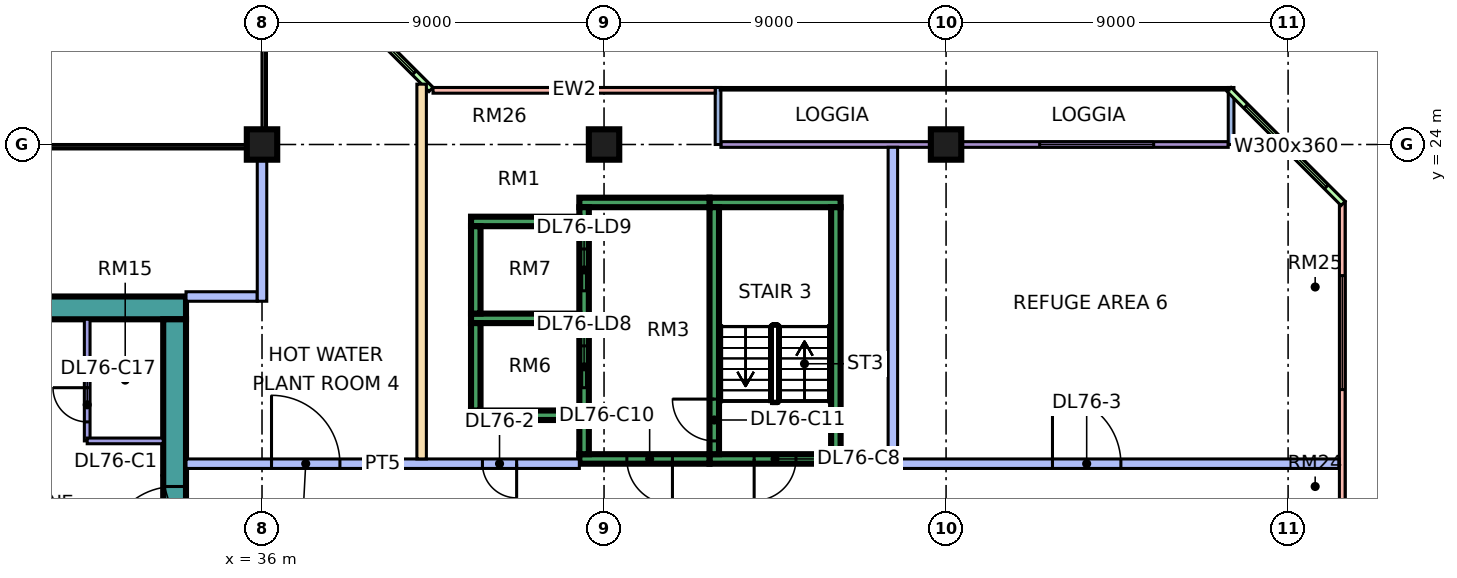
"""IFC4 building model, lengths in metres.
Left out: names, types, materials, properties, quantities, classifications, styles, units other than length and angle.
Written with IfcOpenShell. Run it as: python <this file> out.ifc"""

import sys

from ifc_helpers import new_model, si_unit, direction, frame, frame_2d, origin, origin_2d, place, context, subcontext, project, spatial, rectangle, extrude, element, fill, save


model = new_model("IFC4")
c1 = context("Model", 3, precision=1e-05, world=origin(), true_north=direction((0.0, 1.0)))
c2 = subcontext(c1, "Body", "Model", "MODEL_VIEW")
j1 = project(units=[si_unit("LENGTHUNIT", "METRE"), si_unit("PLANEANGLEUNIT", "RADIAN")], contexts=[c1])
p1 = place(None, origin())
s1 = spatial("IfcSite", under=j1, at=p1, CompositionType="ELEMENT")
p2 = place(p1, origin())
s2 = spatial("IfcBuilding", under=s1, at=p2, CompositionType="ELEMENT")
p3 = place(p2, frame((0.0, 0.0, 322.15)))
s3 = spatial("IfcBuildingStorey", under=s2, at=p3, CompositionType="ELEMENT", Elevation=322.15)
for number, where, z_axis, x_axis in (
    (1, (36.0, 24.0, 0.0), (0.0, 0.0, 1.0), (1.0, 0.0, 0.0)),
    (2, (45.0, 24.0, 0.0), (0.0, 0.0, 1.0), (1.0, 0.0, 0.0)),
    (3, (54.0, 24.0, 0.0), (0.0, 0.0, 1.0), (1.0, 0.0, 0.0)),
):
    element("IfcColumn", number, at=place(p3, frame(where, z_axis=z_axis, x_axis=x_axis)), inside=s3, PredefinedType="COLUMN", context=c2, shape_type="SweptSolid", body=[
        extrude(rectangle(XDim=0.8, YDim=0.8, at=origin_2d()), origin(), (0.0, 0.0, 1.0), 5.5),
    ])
p4 = place(p3, frame((9.0, 19.7, 0.0), z_axis=(0.0, 0.0, 1.0), x_axis=(1.0, 0.0, 0.0)))
e4 = element("IfcWall", 4, at=p4, inside=s3, PredefinedType="SHEAR", context=c2, shape_type="SweptSolid", body=[
    extrude(rectangle(XDim=25.0, YDim=0.6, at=frame_2d((12.5, 0.0))), origin(), (0.0, 0.0, 1.0), 5.5),
])
p5 = place(p4, frame((19.1, 0.0, 0.0)))
e5 = element("IfcOpeningElement", 5, at=p5, cuts=e4, PredefinedType="OPENING", context=c2, shape_type="SweptSolid", body=[
    extrude(rectangle(XDim=1.8, YDim=2.4, at=frame_2d((0.9, 1.2))), frame((0.0, 0.31, 0.0), z_axis=(0.0, -1.0, 0.0), x_axis=(1.0, 0.0, 0.0)), (0.0, 0.0, 1.0), 0.62),
])
p6 = place(p3, frame((33.7, 7.6, 0.0), z_axis=(0.0, 0.0, 1.0), x_axis=(0.0, 1.0, 0.0)))
e6 = element("IfcWall", 6, at=p6, inside=s3, PredefinedType="SHEAR", context=c2, shape_type="SweptSolid", body=[
    extrude(rectangle(XDim=11.8, YDim=0.6, at=frame_2d((5.9, 0.0))), origin(), (0.0, 0.0, 1.0), 5.5),
])
p7 = place(p6, frame((5.6, 0.0, 0.0)))
e7 = element("IfcOpeningElement", 7, at=p7, cuts=e6, PredefinedType="OPENING", context=c2, shape_type="SweptSolid", body=[
    extrude(rectangle(XDim=1.8, YDim=2.4, at=frame_2d((0.9, 1.2))), frame((0.0, 0.31, 0.0), z_axis=(0.0, -1.0, 0.0), x_axis=(1.0, 0.0, 0.0)), (0.0, 0.0, 1.0), 0.62),
])
p8 = place(p3, frame((47.775, 15.725, 0.0), z_axis=(0.0, 0.0, 1.0), x_axis=(1.0, 0.0, 0.0)))
e8 = element("IfcWall", 8, at=p8, inside=s3, PredefinedType="SHEAR", context=c2, shape_type="SweptSolid", body=[
    extrude(rectangle(XDim=3.45, YDim=0.25, at=frame_2d((1.725, 0.0))), origin(), (0.0, 0.0, 1.0), 5.5),
])
p9 = place(p8, frame((1.175, 0.0, 0.0)))
e9 = element("IfcOpeningElement", 9, at=p9, cuts=e8, PredefinedType="OPENING", context=c2, shape_type="SweptSolid", body=[
    extrude(rectangle(XDim=1.1, YDim=2.2, at=frame_2d((0.55, 1.1))), frame((0.0, 0.135, 0.0), z_axis=(0.0, -1.0, 0.0), x_axis=(1.0, 0.0, 0.0)), (0.0, 0.0, 1.0), 0.27),
])
p10 = place(p3, frame((47.775, 22.475, 0.0), z_axis=(0.0, 0.0, 1.0), x_axis=(1.0, 0.0, 0.0)))
e10 = element("IfcWall", 10, at=p10, inside=s3, PredefinedType="SHEAR", context=c2, shape_type="SweptSolid", body=[
    extrude(rectangle(XDim=3.45, YDim=0.25, at=frame_2d((1.725, 0.0))), origin(), (0.0, 0.0, 1.0), 5.5),
])
p11 = place(p3, frame((47.9, 15.85, 0.0), z_axis=(0.0, 0.0, 1.0), x_axis=(0.0, 1.0, 0.0)))
e11 = element("IfcWall", 11, at=p11, inside=s3, PredefinedType="SHEAR", context=c2, shape_type="SweptSolid", body=[
    extrude(rectangle(XDim=6.5, YDim=0.25, at=frame_2d((3.25, 0.0))), origin(), (0.0, 0.0, 1.0), 5.5),
])
p12 = place(p11, frame((0.35, 0.0, 0.0)))
e12 = element("IfcOpeningElement", 12, at=p12, cuts=e11, PredefinedType="OPENING", context=c2, shape_type="SweptSolid", body=[
    extrude(rectangle(XDim=1.1, YDim=2.2, at=frame_2d((0.55, 1.1))), frame((0.0, 0.135, 0.0), z_axis=(0.0, -1.0, 0.0), x_axis=(1.0, 0.0, 0.0)), (0.0, 0.0, 1.0), 0.27),
])
p13 = place(p3, frame((51.1, 15.85, 0.0), z_axis=(0.0, 0.0, 1.0), x_axis=(0.0, 1.0, 0.0)))
e13 = element("IfcWall", 13, at=p13, inside=s3, PredefinedType="SHEAR", context=c2, shape_type="SweptSolid", body=[
    extrude(rectangle(XDim=6.5, YDim=0.25, at=frame_2d((3.25, 0.0))), origin(), (0.0, 0.0, 1.0), 5.5),
])
p14 = place(p3, frame((44.35, 15.725, 0.0), z_axis=(0.0, 0.0, 1.0), x_axis=(1.0, 0.0, 0.0)))
e14 = element("IfcWall", 14, at=p14, inside=s3, PredefinedType="SHEAR", context=c2, shape_type="SweptSolid", body=[
    extrude(rectangle(XDim=3.425, YDim=0.25, at=frame_2d((1.712, 0.0))), origin(), (0.0, 0.0, 1.0), 5.5),
])
p15 = place(p14, frame((1.25, 0.0, 0.0)))
e15 = element("IfcOpeningElement", 15, at=p15, cuts=e14, PredefinedType="OPENING", context=c2, shape_type="SweptSolid", body=[
    extrude(rectangle(XDim=1.2, YDim=2.2, at=frame_2d((0.6, 1.1))), frame((0.0, 0.135, 0.0), z_axis=(0.0, -1.0, 0.0), x_axis=(1.0, 0.0, 0.0)), (0.0, 0.0, 1.0), 0.27),
])
p16 = place(p3, frame((44.35, 22.475, 0.0), z_axis=(0.0, 0.0, 1.0), x_axis=(1.0, 0.0, 0.0)))
e16 = element("IfcWall", 16, at=p16, inside=s3, PredefinedType="SHEAR", context=c2, shape_type="SweptSolid", body=[
    extrude(rectangle(XDim=3.425, YDim=0.25, at=frame_2d((1.712, 0.0))), origin(), (0.0, 0.0, 1.0), 5.5),
])
p17 = place(p3, frame((44.475, 15.85, 0.0), z_axis=(0.0, 0.0, 1.0), x_axis=(0.0, 1.0, 0.0)))
e17 = element("IfcWall", 17, at=p17, inside=s3, PredefinedType="SHEAR", context=c2, shape_type="SweptSolid", body=[
    extrude(rectangle(XDim=6.5, YDim=0.25, at=frame_2d((3.25, 0.0))), origin(), (0.0, 0.0, 1.0), 5.5),
])
p18 = place(p17, frame((1.75, 0.0, 0.0)))
e18 = element("IfcOpeningElement", 18, at=p18, cuts=e17, PredefinedType="OPENING", context=c2, shape_type="SweptSolid", body=[
    extrude(rectangle(XDim=1.1, YDim=2.2, at=frame_2d((0.55, 1.1))), frame((0.0, 0.135, 0.0), z_axis=(0.0, -1.0, 0.0), x_axis=(1.0, 0.0, 0.0)), (0.0, 0.0, 1.0), 0.27),
])
p19 = place(p17, frame((4.3, 0.0, 0.0)))
e19 = element("IfcOpeningElement", 19, at=p19, cuts=e17, PredefinedType="OPENING", context=c2, shape_type="SweptSolid", body=[
    extrude(rectangle(XDim=1.1, YDim=2.2, at=frame_2d((0.55, 1.1))), frame((0.0, 0.135, 0.0), z_axis=(0.0, -1.0, 0.0), x_axis=(1.0, 0.0, 0.0)), (0.0, 0.0, 1.0), 0.27),
])
for number, where, z_axis, x_axis in (
    (20, (41.5, 16.875, 0.0), (0.0, 0.0, 1.0), (1.0, 0.0, 0.0)),
    (21, (41.5, 19.425, 0.0), (0.0, 0.0, 1.0), (1.0, 0.0, 0.0)),
    (22, (41.5, 21.975, 0.0), (0.0, 0.0, 1.0), (1.0, 0.0, 0.0)),
):
    element("IfcWall", number, at=place(p3, frame(where, z_axis=z_axis, x_axis=x_axis)), inside=s3, PredefinedType="SHEAR", context=c2, shape_type="SweptSolid", body=[
        extrude(rectangle(XDim=2.85, YDim=0.25, at=frame_2d((1.425, 0.0))), origin(), (0.0, 0.0, 1.0), 5.5),
    ])
for number, where, z_axis, x_axis in (
    (23, (41.625, 17.0, 0.0), (0.0, 0.0, 1.0), (0.0, 1.0, 0.0)),
    (24, (41.625, 19.55, 0.0), (0.0, 0.0, 1.0), (0.0, 1.0, 0.0)),
):
    element("IfcWall", number, at=place(p3, frame(where, z_axis=z_axis, x_axis=x_axis)), inside=s3, PredefinedType="SHEAR", context=c2, shape_type="SweptSolid", body=[
        extrude(rectangle(XDim=2.3, YDim=0.25, at=frame_2d((1.15, 0.0))), origin(), (0.0, 0.0, 1.0), 5.5),
    ])
p20 = place(p3, frame((61.425, 24.0, 0.0), z_axis=(0.0, 0.0, 1.0), x_axis=(-1.0, 0.0, 0.0)))
e25 = element("IfcWall", 25, at=p20, inside=s3, PredefinedType="SOLIDWALL", context=c2, shape_type="SweptSolid", body=[
    extrude(rectangle(XDim=13.35, YDim=0.15, at=frame_2d((6.675, 0.0))), origin(), (0.0, 0.0, 1.0), 5.05),
])
p21 = place(p20, frame((1.962, 0.0, 0.45)))
e26 = element("IfcOpeningElement", 26, at=p21, cuts=e25, PredefinedType="OPENING", context=c2, shape_type="SweptSolid", body=[
    extrude(rectangle(XDim=3.0, YDim=3.6, at=frame_2d((1.5, 1.8))), frame((0.0, 0.085, 0.0), z_axis=(0.0, -1.0, 0.0), x_axis=(1.0, 0.0, 0.0)), (0.0, 0.0, 1.0), 0.17),
])
for number, where, z_axis, x_axis in (
    (27, (61.5, 25.5, 0.0), (0.0, 0.0, 1.0), (0.0, -1.0, 0.0)),
    (28, (48.0, 25.5, 0.0), (0.0, 0.0, 1.0), (0.0, -1.0, 0.0)),
):
    element("IfcWall", number, at=place(p3, frame(where, z_axis=z_axis, x_axis=x_axis)), inside=s3, PredefinedType="SOLIDWALL", context=c2, shape_type="SweptSolid", body=[
        extrude(rectangle(XDim=1.5, YDim=0.15, at=frame_2d((0.75, 0.0))), origin(), (0.0, 0.0, 1.0), 5.05),
    ])
p22 = place(p3, frame((47.925, 25.425, 0.0), z_axis=(0.0, 0.0, 1.0), x_axis=(-1.0, 0.0, 0.0)))
e29 = element("IfcWall", 29, at=p22, inside=s3, PredefinedType="SOLIDWALL", context=c2, shape_type="SweptSolid", body=[
    extrude(rectangle(XDim=7.425, YDim=0.15, at=frame_2d((3.712, 0.0))), origin(), (0.0, 0.0, 1.0), 5.05),
])
p23 = place(p3, frame((40.447, 25.447, 0.0), z_axis=(0.0, 0.0, 1.0), x_axis=(-0.707106781187, 0.707106781187, 0.0)))
e30 = element("IfcWall", 30, at=p23, inside=s3, PredefinedType="SOLIDWALL", context=c2, shape_type="SweptSolid", body=[
    extrude(rectangle(XDim=4.243, YDim=0.15, at=frame_2d((2.121, 0.0))), origin(), (0.0, 0.0, 1.0), 5.05),
])
p24 = place(p23, frame((0.621, 0.0, 0.45)))
e31 = element("IfcOpeningElement", 31, at=p24, cuts=e30, PredefinedType="OPENING", context=c2, shape_type="SweptSolid", body=[
    extrude(rectangle(XDim=3.0, YDim=3.6, at=frame_2d((1.5, 1.8))), frame((0.0, 0.085, 0.0), z_axis=(0.0, -1.0, 0.0), x_axis=(1.0, 0.0, 0.0)), (0.0, 0.0, 1.0), 0.17),
])
p25 = place(p3, frame((64.425, 12.075, 0.0), z_axis=(0.0, 0.0, 1.0), x_axis=(0.0, 1.0, 0.0)))
e32 = element("IfcWall", 32, at=p25, inside=s3, PredefinedType="SOLIDWALL", context=c2, shape_type="SweptSolid", body=[
    extrude(rectangle(XDim=10.425, YDim=0.15, at=frame_2d((5.212, 0.0))), origin(), (0.0, 0.0, 1.0), 5.05),
])
p26 = place(p25, frame((5.475, 0.0, 0.45)))
e33 = element("IfcOpeningElement", 33, at=p26, cuts=e32, PredefinedType="OPENING", context=c2, shape_type="SweptSolid", body=[
    extrude(rectangle(XDim=3.0, YDim=3.6, at=frame_2d((1.5, 1.8))), frame((0.0, 0.085, 0.0), z_axis=(0.0, -1.0, 0.0), x_axis=(1.0, 0.0, 0.0)), (0.0, 0.0, 1.0), 0.17),
])
p27 = place(p3, frame((64.447, 22.447, 0.0), z_axis=(0.0, 0.0, 1.0), x_axis=(-0.707106781187, 0.707106781187, 0.0)))
e34 = element("IfcWall", 34, at=p27, inside=s3, PredefinedType="SOLIDWALL", context=c2, shape_type="SweptSolid", body=[
    extrude(rectangle(XDim=4.243, YDim=0.15, at=frame_2d((2.121, 0.0))), origin(), (0.0, 0.0, 1.0), 5.05),
])
p28 = place(p27, frame((0.621, 0.0, 0.45)))
e35 = element("IfcOpeningElement", 35, at=p28, cuts=e34, PredefinedType="OPENING", context=c2, shape_type="SweptSolid", body=[
    extrude(rectangle(XDim=3.0, YDim=3.6, at=frame_2d((1.5, 1.8))), frame((0.0, 0.085, 0.0), z_axis=(0.0, -1.0, 0.0), x_axis=(1.0, 0.0, 0.0)), (0.0, 0.0, 1.0), 0.17),
])
p29 = place(p3, frame((31.4, 16.2, 0.0), z_axis=(0.0, 0.0, 1.0), x_axis=(0.0, 1.0, 0.0)))
e36 = element("IfcWall", 36, at=p29, inside=s3, PredefinedType="PARTITIONING", context=c2, shape_type="SweptSolid", body=[
    extrude(rectangle(XDim=3.2, YDim=0.15, at=frame_2d((1.6, 0.0))), origin(), (0.0, 0.0, 1.0), 5.05),
])
p30 = place(p29, frame((0.5, 0.0, 0.0)))
e37 = element("IfcOpeningElement", 37, at=p30, cuts=e36, PredefinedType="OPENING", context=c2, shape_type="SweptSolid", body=[
    extrude(rectangle(XDim=0.9, YDim=2.1, at=frame_2d((0.45, 1.05))), frame((0.0, 0.085, 0.0), z_axis=(0.0, -1.0, 0.0), x_axis=(1.0, 0.0, 0.0)), (0.0, 0.0, 1.0), 0.17),
])
p31 = place(p3, frame((31.4, 16.2, 0.0), z_axis=(0.0, 0.0, 1.0), x_axis=(1.0, 0.0, 0.0)))
e38 = element("IfcWall", 38, at=p31, inside=s3, PredefinedType="PARTITIONING", context=c2, shape_type="SweptSolid", body=[
    extrude(rectangle(XDim=2.0, YDim=0.15, at=frame_2d((1.0, 0.0))), origin(), (0.0, 0.0, 1.0), 5.05),
])
p32 = place(p3, frame((34.0, 15.6, 0.0), z_axis=(0.0, 0.0, 1.0), x_axis=(1.0, 0.0, 0.0)))
e39 = element("IfcWall", 39, at=p32, inside=s3, PredefinedType="PARTITIONING", context=c2, shape_type="SweptSolid", body=[
    extrude(rectangle(XDim=10.35, YDim=0.25, at=frame_2d((5.175, 0.0))), origin(), (0.0, 0.0, 1.0), 5.05),
])
p33 = place(p32, frame((2.25, 0.0, 0.0)))
e40 = element("IfcOpeningElement", 40, at=p33, cuts=e39, PredefinedType="OPENING", context=c2, shape_type="SweptSolid", body=[
    extrude(rectangle(XDim=1.8, YDim=2.1, at=frame_2d((0.9, 1.05))), frame((0.0, 0.135, 0.0), z_axis=(0.0, -1.0, 0.0), x_axis=(1.0, 0.0, 0.0)), (0.0, 0.0, 1.0), 0.27),
])
p34 = place(p32, frame((7.8, 0.0, 0.0)))
e41 = element("IfcOpeningElement", 41, at=p34, cuts=e39, PredefinedType="OPENING", context=c2, shape_type="SweptSolid", body=[
    extrude(rectangle(XDim=0.9, YDim=2.1, at=frame_2d((0.45, 1.05))), frame((0.0, 0.135, 0.0), z_axis=(0.0, -1.0, 0.0), x_axis=(1.0, 0.0, 0.0)), (0.0, 0.0, 1.0), 0.27),
])
p35 = place(p3, frame((34.0, 20.0, 0.0), z_axis=(0.0, 0.0, 1.0), x_axis=(1.0, 0.0, 0.0)))
e42 = element("IfcWall", 42, at=p35, inside=s3, PredefinedType="PARTITIONING", context=c2, shape_type="SweptSolid", body=[
    extrude(rectangle(XDim=1.875, YDim=0.25, at=frame_2d((0.938, 0.0))), origin(), (0.0, 0.0, 1.0), 5.05),
])
p36 = place(p3, frame((36.0, 19.875, 0.0), z_axis=(0.0, 0.0, 1.0), x_axis=(0.0, 1.0, 0.0)))
e43 = element("IfcWall", 43, at=p36, inside=s3, PredefinedType="PARTITIONING", context=c2, shape_type="SweptSolid", body=[
    extrude(rectangle(XDim=4.125, YDim=0.25, at=frame_2d((2.062, 0.0))), origin(), (0.0, 0.0, 1.0), 5.05),
])
p37 = place(p3, frame((40.2, 15.725, 0.0), z_axis=(0.0, 0.0, 1.0), x_axis=(0.0, 1.0, 0.0)))
e44 = element("IfcWall", 44, at=p37, inside=s3, PredefinedType="PARTITIONING", context=c2, shape_type="SweptSolid", body=[
    extrude(rectangle(XDim=9.863, YDim=0.25, at=frame_2d((4.931, 0.0))), origin(), (0.0, 0.0, 1.0), 5.05),
])
p38 = place(p3, frame((51.225, 15.6, 0.0), z_axis=(0.0, 0.0, 1.0), x_axis=(1.0, 0.0, 0.0)))
e45 = element("IfcWall", 45, at=p38, inside=s3, PredefinedType="PARTITIONING", context=c2, shape_type="SweptSolid", body=[
    extrude(rectangle(XDim=13.125, YDim=0.25, at=frame_2d((6.562, 0.0))), origin(), (0.0, 0.0, 1.0), 5.05),
])
p39 = place(p38, frame((5.575, 0.0, 0.0)))
e46 = element("IfcOpeningElement", 46, at=p39, cuts=e45, PredefinedType="OPENING", context=c2, shape_type="SweptSolid", body=[
    extrude(rectangle(XDim=1.8, YDim=2.1, at=frame_2d((0.9, 1.05))), frame((0.0, 0.135, 0.0), z_axis=(0.0, -1.0, 0.0), x_axis=(1.0, 0.0, 0.0)), (0.0, 0.0, 1.0), 0.27),
])
p40 = place(p3, frame((52.6, 15.725, 0.0), z_axis=(0.0, 0.0, 1.0), x_axis=(0.0, 1.0, 0.0)))
e47 = element("IfcWall", 47, at=p40, inside=s3, PredefinedType="PARTITIONING", context=c2, shape_type="SweptSolid", body=[
    extrude(rectangle(XDim=8.201, YDim=0.25, at=frame_2d((4.101, 0.0))), origin(), (0.0, 0.0, 1.0), 5.05),
])
p41 = place(p21, origin())
e48 = element("IfcWindow", 48, at=p41, inside=s3, PartitioningType="SINGLE_PANEL", PredefinedType="WINDOW", context=c2, shape_type="SweptSolid", body=[
    extrude(rectangle(XDim=3.0, YDim=3.6, at=frame_2d((1.5, 1.8))), frame((0.0, 0.03, 0.0), z_axis=(0.0, -1.0, 0.0), x_axis=(1.0, 0.0, 0.0)), (0.0, 0.0, 1.0), 0.06),
])
fill(e26, e48)
p42 = place(p24, origin())
e49 = element("IfcWindow", 49, at=p42, inside=s3, PartitioningType="SINGLE_PANEL", PredefinedType="WINDOW", context=c2, shape_type="SweptSolid", body=[
    extrude(rectangle(XDim=3.0, YDim=3.6, at=frame_2d((1.5, 1.8))), frame((0.0, 0.03, 0.0), z_axis=(0.0, -1.0, 0.0), x_axis=(1.0, 0.0, 0.0)), (0.0, 0.0, 1.0), 0.06),
])
fill(e31, e49)
p43 = place(p26, origin())
e50 = element("IfcWindow", 50, at=p43, inside=s3, PartitioningType="SINGLE_PANEL", PredefinedType="WINDOW", context=c2, shape_type="SweptSolid", body=[
    extrude(rectangle(XDim=3.0, YDim=3.6, at=frame_2d((1.5, 1.8))), frame((0.0, 0.03, 0.0), z_axis=(0.0, -1.0, 0.0), x_axis=(1.0, 0.0, 0.0)), (0.0, 0.0, 1.0), 0.06),
])
fill(e33, e50)
p44 = place(p28, origin())
e51 = element("IfcWindow", 51, at=p44, inside=s3, PartitioningType="SINGLE_PANEL", PredefinedType="WINDOW", context=c2, shape_type="SweptSolid", body=[
    extrude(rectangle(XDim=3.0, YDim=3.6, at=frame_2d((1.5, 1.8))), frame((0.0, 0.03, 0.0), z_axis=(0.0, -1.0, 0.0), x_axis=(1.0, 0.0, 0.0)), (0.0, 0.0, 1.0), 0.06),
])
fill(e35, e51)
p45 = place(p7, origin())
e52 = element("IfcDoor", 52, at=p45, inside=s3, OperationType="DOUBLE_DOOR_SINGLE_SWING", PredefinedType="DOOR", context=c2, shape_type="SweptSolid", body=[
    extrude(rectangle(XDim=1.8, YDim=2.4, at=frame_2d((0.9, 1.2))), frame((0.0, 0.025, 0.0), z_axis=(0.0, -1.0, 0.0), x_axis=(1.0, 0.0, 0.0)), (0.0, 0.0, 1.0), 0.05),
])
fill(e7, e52)
p46 = place(p9, frame((1.1, 0.0, 0.0), z_axis=(0.0, 0.0, 1.0), x_axis=(-1.0, 0.0, 0.0)))
e53 = element("IfcDoor", 53, at=p46, inside=s3, OperationType="SINGLE_SWING_LEFT", PredefinedType="DOOR", context=c2, shape_type="SweptSolid", body=[
    extrude(rectangle(XDim=1.1, YDim=2.2, at=frame_2d((0.55, 1.1))), frame((0.0, 0.025, 0.0), z_axis=(0.0, -1.0, 0.0), x_axis=(1.0, 0.0, 0.0)), (0.0, 0.0, 1.0), 0.05),
])
fill(e9, e53)
p47 = place(p15, origin())
e54 = element("IfcDoor", 54, at=p47, inside=s3, OperationType="SINGLE_SWING_RIGHT", PredefinedType="DOOR", context=c2, shape_type="SweptSolid", body=[
    extrude(rectangle(XDim=1.2, YDim=2.2, at=frame_2d((0.6, 1.1))), frame((0.0, 0.025, 0.0), z_axis=(0.0, -1.0, 0.0), x_axis=(1.0, 0.0, 0.0)), (0.0, 0.0, 1.0), 0.05),
])
fill(e15, e54)
p48 = place(p12, frame((1.1, 0.0, 0.0), z_axis=(0.0, 0.0, 1.0), x_axis=(-1.0, 0.0, 0.0)))
e55 = element("IfcDoor", 55, at=p48, inside=s3, OperationType="SINGLE_SWING_RIGHT", PredefinedType="DOOR", context=c2, shape_type="SweptSolid", body=[
    extrude(rectangle(XDim=1.1, YDim=2.2, at=frame_2d((0.55, 1.1))), frame((0.0, 0.025, 0.0), z_axis=(0.0, -1.0, 0.0), x_axis=(1.0, 0.0, 0.0)), (0.0, 0.0, 1.0), 0.05),
])
fill(e12, e55)
p49 = place(p18, origin())
e56 = element("IfcDoor", 56, at=p49, inside=s3, OperationType="DOUBLE_DOOR_SLIDING", PredefinedType="DOOR", context=c2, shape_type="SweptSolid", body=[
    extrude(rectangle(XDim=1.1, YDim=2.2, at=frame_2d((0.55, 1.1))), frame((0.0, 0.025, 0.0), z_axis=(0.0, -1.0, 0.0), x_axis=(1.0, 0.0, 0.0)), (0.0, 0.0, 1.0), 0.05),
])
fill(e18, e56)
p50 = place(p19, origin())
e57 = element("IfcDoor", 57, at=p50, inside=s3, OperationType="DOUBLE_DOOR_SLIDING", PredefinedType="DOOR", context=c2, shape_type="SweptSolid", body=[
    extrude(rectangle(XDim=1.1, YDim=2.2, at=frame_2d((0.55, 1.1))), frame((0.0, 0.025, 0.0), z_axis=(0.0, -1.0, 0.0), x_axis=(1.0, 0.0, 0.0)), (0.0, 0.0, 1.0), 0.05),
])
fill(e19, e57)
p51 = place(p30, frame((0.9, 0.0, 0.0), z_axis=(0.0, 0.0, 1.0), x_axis=(-1.0, 0.0, 0.0)))
e58 = element("IfcDoor", 58, at=p51, inside=s3, OperationType="SINGLE_SWING_RIGHT", PredefinedType="DOOR", context=c2, shape_type="SweptSolid", body=[
    extrude(rectangle(XDim=0.9, YDim=2.1, at=frame_2d((0.45, 1.05))), frame((0.0, 0.025, 0.0), z_axis=(0.0, -1.0, 0.0), x_axis=(1.0, 0.0, 0.0)), (0.0, 0.0, 1.0), 0.05),
])
fill(e37, e58)
p52 = place(p33, origin())
e59 = element("IfcDoor", 59, at=p52, inside=s3, OperationType="DOUBLE_DOOR_SINGLE_SWING", PredefinedType="DOOR", context=c2, shape_type="SweptSolid", body=[
    extrude(rectangle(XDim=1.8, YDim=2.1, at=frame_2d((0.9, 1.05))), frame((0.0, 0.025, 0.0), z_axis=(0.0, -1.0, 0.0), x_axis=(1.0, 0.0, 0.0)), (0.0, 0.0, 1.0), 0.05),
])
fill(e40, e59)
p53 = place(p34, origin())
e60 = element("IfcDoor", 60, at=p53, inside=s3, OperationType="SINGLE_SWING_RIGHT", PredefinedType="DOOR", context=c2, shape_type="SweptSolid", body=[
    extrude(rectangle(XDim=0.9, YDim=2.1, at=frame_2d((0.45, 1.05))), frame((0.0, 0.025, 0.0), z_axis=(0.0, -1.0, 0.0), x_axis=(1.0, 0.0, 0.0)), (0.0, 0.0, 1.0), 0.05),
])
fill(e41, e60)
p54 = place(p39, origin())
e61 = element("IfcDoor", 61, at=p54, inside=s3, OperationType="DOUBLE_DOOR_SINGLE_SWING", PredefinedType="DOOR", context=c2, shape_type="SweptSolid", body=[
    extrude(rectangle(XDim=1.8, YDim=2.1, at=frame_2d((0.9, 1.05))), frame((0.0, 0.025, 0.0), z_axis=(0.0, -1.0, 0.0), x_axis=(1.0, 0.0, 0.0)), (0.0, 0.0, 1.0), 0.05),
])
fill(e46, e61)
save(model, sys.argv[1])
